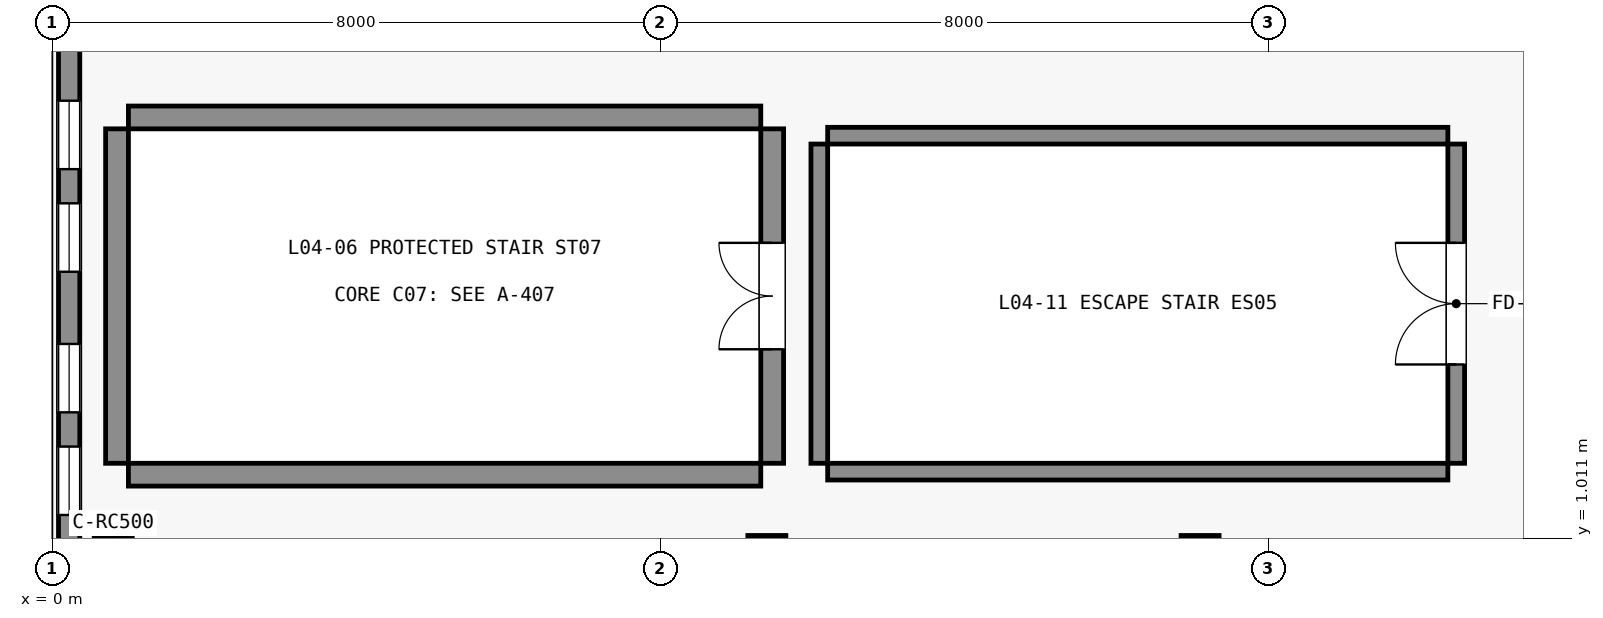
"""IFC4 building model, lengths in metres.
Left out: names, types, materials, properties, quantities, classifications, styles, units other than length and angle.
Written with IfcOpenShell. Run it as: python <this file> out.ifc"""

import sys

from ifc_helpers import new_model, si_unit, direction, frame, frame_2d, origin, origin_2d, place, context, subcontext, project, spatial, rectangle, extrude, element, fill, save


model = new_model("IFC4")
c1 = context("Model", 3, precision=1e-05, world=origin(), true_north=direction((0.0, 1.0)))
c2 = subcontext(c1, "Body", "Model", "MODEL_VIEW")
j1 = project(units=[si_unit("LENGTHUNIT", "METRE"), si_unit("PLANEANGLEUNIT", "RADIAN")], contexts=[c1])
p1 = place(None, origin())
s1 = spatial("IfcSite", under=j1, at=p1, CompositionType="ELEMENT")
p2 = place(p1, origin())
s2 = spatial("IfcBuilding", under=s1, at=p2, CompositionType="ELEMENT")
p3 = place(p2, frame((0.0, 0.0, 21.0)))
s3 = spatial("IfcBuildingStorey", under=s2, at=p3, CompositionType="ELEMENT", Elevation=21.0)
for number, where, z_axis, x_axis in (
    (1, (0.8, 0.8, 0.0), (0.0, 0.0, 1.0), (1.0, 0.0, 0.0)),
    (2, (9.4, 0.8, 0.0), (0.0, 0.0, 1.0), (1.0, 0.0, 0.0)),
    (3, (15.1, 0.8, 0.0), (0.0, 0.0, 1.0), (1.0, 0.0, 0.0)),
):
    element("IfcColumn", number, at=place(p3, frame(where, z_axis=z_axis, x_axis=x_axis)), inside=s3, PredefinedType="COLUMN", context=c2, shape_type="SweptSolid", body=[
        extrude(rectangle(XDim=0.5, YDim=0.5, at=origin_2d()), origin(), (0.0, 0.0, 1.0), 5.08),
    ])
for number, where, z_axis, x_axis in (
    (4, (1.0, 1.85, 0.0), (0.0, 0.0, 1.0), (1.0, 0.0, 0.0)),
    (5, (1.0, 6.55, 0.0), (0.0, 0.0, 1.0), (1.0, 0.0, 0.0)),
):
    element("IfcWall", number, at=place(p3, frame(where, z_axis=z_axis, x_axis=x_axis)), inside=s3, PredefinedType="SHEAR", context=c2, shape_type="SweptSolid", body=[
        extrude(rectangle(XDim=8.32, YDim=0.3, at=frame_2d((4.16, 0.0))), origin(), (0.0, 0.0, 1.0), 5.08),
    ])
p4 = place(p3, frame((0.85, 2.0, 0.0), z_axis=(0.0, 0.0, 1.0), x_axis=(0.0, 1.0, 0.0)))
e6 = element("IfcWall", 6, at=p4, inside=s3, PredefinedType="SHEAR", context=c2, shape_type="SweptSolid", body=[
    extrude(rectangle(XDim=4.4, YDim=0.3, at=frame_2d((2.2, 0.0))), origin(), (0.0, 0.0, 1.0), 5.08),
])
p5 = place(p3, frame((9.47, 2.0, 0.0), z_axis=(0.0, 0.0, 1.0), x_axis=(0.0, 1.0, 0.0)))
e7 = element("IfcWall", 7, at=p5, inside=s3, PredefinedType="SHEAR", context=c2, shape_type="SweptSolid", body=[
    extrude(rectangle(XDim=4.4, YDim=0.3, at=frame_2d((2.2, 0.0))), origin(), (0.0, 0.0, 1.0), 5.08),
])
p6 = place(p5, frame((1.5, 0.0, 0.0)))
e8 = element("IfcOpeningElement", 8, at=p6, cuts=e7, PredefinedType="OPENING", context=c2, shape_type="SweptSolid", body=[
    extrude(rectangle(XDim=1.4, YDim=2.2, at=frame_2d((0.7, 1.1))), frame((0.0, 0.16, 0.0), z_axis=(0.0, -1.0, 0.0), x_axis=(1.0, 0.0, 0.0)), (0.0, 0.0, 1.0), 0.32),
])
p7 = place(p3, frame((0.22, 0.22, 0.0), z_axis=(0.0, 0.0, 1.0), x_axis=(0.0, 1.0, 0.0)))
e9 = element("IfcWall", 9, at=p7, inside=s3, PredefinedType="STANDARD", context=c2, shape_type="SweptSolid", body=[
    extrude(rectangle(XDim=20.48, YDim=0.28, at=frame_2d((10.24, 0.0))), origin(), (0.0, 0.0, 1.0), 5.08),
])
p8 = place(p7, frame((1.1, 0.0, 0.95)))
e10 = element("IfcOpeningElement", 10, at=p8, cuts=e9, PredefinedType="OPENING", context=c2, shape_type="SweptSolid", body=[
    extrude(rectangle(XDim=0.9, YDim=2.85, at=frame_2d((0.45, 1.425))), frame((0.0, 0.15, 0.0), z_axis=(0.0, -1.0, 0.0), x_axis=(1.0, 0.0, 0.0)), (0.0, 0.0, 1.0), 0.3),
])
p9 = place(p7, frame((2.45, 0.0, 0.95)))
e11 = element("IfcOpeningElement", 11, at=p9, cuts=e9, PredefinedType="OPENING", context=c2, shape_type="SweptSolid", body=[
    extrude(rectangle(XDim=0.9, YDim=2.85, at=frame_2d((0.45, 1.425))), frame((0.0, 0.15, 0.0), z_axis=(0.0, -1.0, 0.0), x_axis=(1.0, 0.0, 0.0)), (0.0, 0.0, 1.0), 0.3),
])
p10 = place(p7, frame((4.3, 0.0, 0.95)))
e12 = element("IfcOpeningElement", 12, at=p10, cuts=e9, PredefinedType="OPENING", context=c2, shape_type="SweptSolid", body=[
    extrude(rectangle(XDim=0.9, YDim=2.85, at=frame_2d((0.45, 1.425))), frame((0.0, 0.15, 0.0), z_axis=(0.0, -1.0, 0.0), x_axis=(1.0, 0.0, 0.0)), (0.0, 0.0, 1.0), 0.3),
])
p11 = place(p7, frame((5.65, 0.0, 0.95)))
e13 = element("IfcOpeningElement", 13, at=p11, cuts=e9, PredefinedType="OPENING", context=c2, shape_type="SweptSolid", body=[
    extrude(rectangle(XDim=0.9, YDim=2.85, at=frame_2d((0.45, 1.425))), frame((0.0, 0.15, 0.0), z_axis=(0.0, -1.0, 0.0), x_axis=(1.0, 0.0, 0.0)), (0.0, 0.0, 1.0), 0.3),
])
p12 = place(p7, frame((7.5, 0.0, 0.95)))
e14 = element("IfcOpeningElement", 14, at=p12, cuts=e9, PredefinedType="OPENING", context=c2, shape_type="SweptSolid", body=[
    extrude(rectangle(XDim=0.9, YDim=2.85, at=frame_2d((0.45, 1.425))), frame((0.0, 0.15, 0.0), z_axis=(0.0, -1.0, 0.0), x_axis=(1.0, 0.0, 0.0)), (0.0, 0.0, 1.0), 0.3),
])
p13 = place(p7, frame((10.7, 0.0, 0.95)))
e15 = element("IfcOpeningElement", 15, at=p13, cuts=e9, PredefinedType="OPENING", context=c2, shape_type="SweptSolid", body=[
    extrude(rectangle(XDim=0.9, YDim=2.85, at=frame_2d((0.45, 1.425))), frame((0.0, 0.15, 0.0), z_axis=(0.0, -1.0, 0.0), x_axis=(1.0, 0.0, 0.0)), (0.0, 0.0, 1.0), 0.3),
])
p14 = place(p7, frame((12.05, 0.0, 0.95)))
e16 = element("IfcOpeningElement", 16, at=p14, cuts=e9, PredefinedType="OPENING", context=c2, shape_type="SweptSolid", body=[
    extrude(rectangle(XDim=0.9, YDim=2.85, at=frame_2d((0.45, 1.425))), frame((0.0, 0.15, 0.0), z_axis=(0.0, -1.0, 0.0), x_axis=(1.0, 0.0, 0.0)), (0.0, 0.0, 1.0), 0.3),
])
p15 = place(p7, frame((13.9, 0.0, 0.95)))
e17 = element("IfcOpeningElement", 17, at=p15, cuts=e9, PredefinedType="OPENING", context=c2, shape_type="SweptSolid", body=[
    extrude(rectangle(XDim=0.9, YDim=2.85, at=frame_2d((0.45, 1.425))), frame((0.0, 0.15, 0.0), z_axis=(0.0, -1.0, 0.0), x_axis=(1.0, 0.0, 0.0)), (0.0, 0.0, 1.0), 0.3),
])
p16 = place(p7, frame((15.25, 0.0, 0.95)))
e18 = element("IfcOpeningElement", 18, at=p16, cuts=e9, PredefinedType="OPENING", context=c2, shape_type="SweptSolid", body=[
    extrude(rectangle(XDim=0.9, YDim=2.85, at=frame_2d((0.45, 1.425))), frame((0.0, 0.15, 0.0), z_axis=(0.0, -1.0, 0.0), x_axis=(1.0, 0.0, 0.0)), (0.0, 0.0, 1.0), 0.3),
])
p17 = place(p7, frame((17.1, 0.0, 0.95)))
e19 = element("IfcOpeningElement", 19, at=p17, cuts=e9, PredefinedType="OPENING", context=c2, shape_type="SweptSolid", body=[
    extrude(rectangle(XDim=0.9, YDim=2.85, at=frame_2d((0.45, 1.425))), frame((0.0, 0.15, 0.0), z_axis=(0.0, -1.0, 0.0), x_axis=(1.0, 0.0, 0.0)), (0.0, 0.0, 1.0), 0.3),
])
for number, where, z_axis, x_axis in (
    (20, (10.2, 1.89, 0.0), (0.0, 0.0, 1.0), (1.0, 0.0, 0.0)),
    (21, (10.2, 6.31, 0.0), (0.0, 0.0, 1.0), (1.0, 0.0, 0.0)),
):
    element("IfcWall", number, at=place(p3, frame(where, z_axis=z_axis, x_axis=x_axis)), inside=s3, PredefinedType="SHEAR", context=c2, shape_type="SweptSolid", body=[
        extrude(rectangle(XDim=8.16, YDim=0.22, at=frame_2d((4.08, 0.0))), origin(), (0.0, 0.0, 1.0), 5.08),
    ])
p18 = place(p3, frame((10.09, 2.0, 0.0), z_axis=(0.0, 0.0, 1.0), x_axis=(0.0, 1.0, 0.0)))
e22 = element("IfcWall", 22, at=p18, inside=s3, PredefinedType="SHEAR", context=c2, shape_type="SweptSolid", body=[
    extrude(rectangle(XDim=4.2, YDim=0.22, at=frame_2d((2.1, 0.0))), origin(), (0.0, 0.0, 1.0), 5.08),
])
p19 = place(p3, frame((18.47, 2.0, 0.0), z_axis=(0.0, 0.0, 1.0), x_axis=(0.0, 1.0, 0.0)))
e23 = element("IfcWall", 23, at=p19, inside=s3, PredefinedType="SHEAR", context=c2, shape_type="SweptSolid", body=[
    extrude(rectangle(XDim=4.2, YDim=0.22, at=frame_2d((2.1, 0.0))), origin(), (0.0, 0.0, 1.0), 5.08),
])
p20 = place(p19, frame((1.3, 0.0, 0.0)))
e24 = element("IfcOpeningElement", 24, at=p20, cuts=e23, PredefinedType="OPENING", context=c2, shape_type="SweptSolid", body=[
    extrude(rectangle(XDim=1.6, YDim=2.2, at=frame_2d((0.8, 1.1))), frame((0.0, 0.12, 0.0), z_axis=(0.0, -1.0, 0.0), x_axis=(1.0, 0.0, 0.0)), (0.0, 0.0, 1.0), 0.24),
])
p21 = place(p8, origin())
e25 = element("IfcWindow", 25, at=p21, inside=s3, PartitioningType="DOUBLE_PANEL_VERTICAL", PredefinedType="WINDOW", context=c2, shape_type="SweptSolid", body=[
    extrude(rectangle(XDim=0.9, YDim=2.85, at=frame_2d((0.45, 1.425))), frame((0.0, 0.03, 0.0), z_axis=(0.0, -1.0, 0.0), x_axis=(1.0, 0.0, 0.0)), (0.0, 0.0, 1.0), 0.06),
])
fill(e10, e25)
p22 = place(p9, origin())
e26 = element("IfcWindow", 26, at=p22, inside=s3, PartitioningType="DOUBLE_PANEL_VERTICAL", PredefinedType="WINDOW", context=c2, shape_type="SweptSolid", body=[
    extrude(rectangle(XDim=0.9, YDim=2.85, at=frame_2d((0.45, 1.425))), frame((0.0, 0.03, 0.0), z_axis=(0.0, -1.0, 0.0), x_axis=(1.0, 0.0, 0.0)), (0.0, 0.0, 1.0), 0.06),
])
fill(e11, e26)
p23 = place(p10, origin())
e27 = element("IfcWindow", 27, at=p23, inside=s3, PartitioningType="DOUBLE_PANEL_VERTICAL", PredefinedType="WINDOW", context=c2, shape_type="SweptSolid", body=[
    extrude(rectangle(XDim=0.9, YDim=2.85, at=frame_2d((0.45, 1.425))), frame((0.0, 0.03, 0.0), z_axis=(0.0, -1.0, 0.0), x_axis=(1.0, 0.0, 0.0)), (0.0, 0.0, 1.0), 0.06),
])
fill(e12, e27)
p24 = place(p11, origin())
e28 = element("IfcWindow", 28, at=p24, inside=s3, PartitioningType="DOUBLE_PANEL_VERTICAL", PredefinedType="WINDOW", context=c2, shape_type="SweptSolid", body=[
    extrude(rectangle(XDim=0.9, YDim=2.85, at=frame_2d((0.45, 1.425))), frame((0.0, 0.03, 0.0), z_axis=(0.0, -1.0, 0.0), x_axis=(1.0, 0.0, 0.0)), (0.0, 0.0, 1.0), 0.06),
])
fill(e13, e28)
p25 = place(p6, origin())
e29 = element("IfcDoor", 29, at=p25, inside=s3, OperationType="DOUBLE_DOOR_SINGLE_SWING", PredefinedType="DOOR", context=c2, shape_type="SweptSolid", body=[
    extrude(rectangle(XDim=1.4, YDim=2.2, at=frame_2d((0.7, 1.1))), frame((0.0, 0.025, 0.0), z_axis=(0.0, -1.0, 0.0), x_axis=(1.0, 0.0, 0.0)), (0.0, 0.0, 1.0), 0.05),
])
fill(e8, e29)
p26 = place(p20, origin())
e30 = element("IfcDoor", 30, at=p26, inside=s3, OperationType="DOUBLE_DOOR_SINGLE_SWING", PredefinedType="DOOR", context=c2, shape_type="SweptSolid", body=[
    extrude(rectangle(XDim=1.6, YDim=2.2, at=frame_2d((0.8, 1.1))), frame((0.0, 0.025, 0.0), z_axis=(0.0, -1.0, 0.0), x_axis=(1.0, 0.0, 0.0)), (0.0, 0.0, 1.0), 0.05),
])
fill(e24, e30)
save(model, sys.argv[1])
